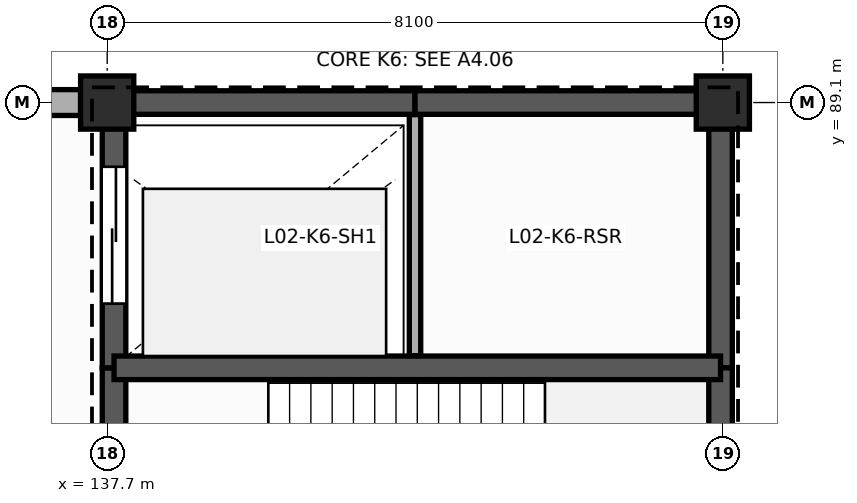
"""IFC4 building model, lengths in metres.
Left out: names, types, materials, properties, quantities, classifications, styles, units other than length and angle.
Written with IfcOpenShell. Run it as: python <this file> out.ifc"""

import sys

from ifc_helpers import new_model, si_unit, direction, frame, frame_2d, origin, origin_2d, place, context, subcontext, project, spatial, rectangle, extrude, element, fill, save


model = new_model("IFC4")
c1 = context("Model", 3, precision=1e-05, world=origin(), true_north=direction((0.0, 1.0)))
c2 = subcontext(c1, "Body", "Model", "MODEL_VIEW")
j1 = project(units=[si_unit("LENGTHUNIT", "METRE"), si_unit("PLANEANGLEUNIT", "RADIAN")], contexts=[c1])
p1 = place(None, origin())
s1 = spatial("IfcSite", under=j1, at=p1, CompositionType="ELEMENT")
p2 = place(p1, origin())
s2 = spatial("IfcBuilding", under=s1, at=p2, CompositionType="ELEMENT")
p3 = place(p2, frame((0.0, 0.0, 10.2)))
s3 = spatial("IfcBuildingStorey", under=s2, at=p3, CompositionType="ELEMENT", Elevation=10.2)
for number, where, z_axis, x_axis in (
    (1, (137.7, 89.1, 0.0), (0.0, 0.0, 1.0), (1.0, 0.0, 0.0)),
    (2, (145.8, 89.1, 0.0), (0.0, 0.0, 1.0), (1.0, 0.0, 0.0)),
):
    element("IfcColumn", number, at=place(p3, frame(where, z_axis=z_axis, x_axis=x_axis)), inside=s3, PredefinedType="COLUMN", context=c2, shape_type="SweptSolid", body=[
        extrude(rectangle(XDim=0.7, YDim=0.7, at=origin_2d()), origin(), (0.0, 0.0, 1.0), 4.8),
    ])
p4 = place(p3, frame((137.35, 89.1, 0.0), z_axis=(0.0, 0.0, 1.0), x_axis=(-1.0, 0.0, 0.0)))
e3 = element("IfcWall", 3, at=p4, inside=s3, PredefinedType="SOLIDWALL", context=c2, shape_type="SweptSolid", body=[
    extrude(rectangle(XDim=7.4, YDim=0.34, at=frame_2d((3.7, 0.0))), origin(), (0.0, 0.0, 1.0), 4.127),
])
p5 = place(p3, frame((137.79, 81.25, 0.0), z_axis=(0.0, 0.0, 1.0), x_axis=(0.0, 1.0, 0.0)))
e4 = element("IfcWall", 4, at=p5, inside=s3, PredefinedType="SHEAR", context=c2, shape_type="SweptSolid", body=[
    extrude(rectangle(XDim=4.36, YDim=0.31, at=frame_2d((2.18, 0.0))), origin(), (0.0, 0.0, 1.0), 4.8),
])
p6 = place(p5, frame((1.35, 0.0, 0.0)))
e5 = element("IfcOpeningElement", 5, at=p6, cuts=e4, PredefinedType="OPENING", context=c2, shape_type="SweptSolid", body=[
    extrude(rectangle(XDim=1.2, YDim=2.25, at=frame_2d((0.6, 1.125))), frame((0.0, 0.165, 0.0), z_axis=(0.0, -1.0, 0.0), x_axis=(1.0, 0.0, 0.0)), (0.0, 0.0, 1.0), 0.33),
])
p7 = place(p3, frame((137.79, 85.61, 0.0), z_axis=(0.0, 0.0, 1.0), x_axis=(0.0, 1.0, 0.0)))
e6 = element("IfcWall", 6, at=p7, inside=s3, PredefinedType="SHEAR", context=c2, shape_type="SweptSolid", body=[
    extrude(rectangle(XDim=3.49, YDim=0.31, at=frame_2d((1.745, 0.0))), origin(), (0.0, 0.0, 1.0), 4.8),
])
p8 = place(p7, frame((0.845, 0.0, 0.0)))
e7 = element("IfcOpeningElement", 7, at=p8, cuts=e6, PredefinedType="OPENING", context=c2, shape_type="SweptSolid", body=[
    extrude(rectangle(XDim=1.8, YDim=2.4, at=frame_2d((0.9, 1.2))), frame((0.0, 0.165, 0.0), z_axis=(0.0, -1.0, 0.0), x_axis=(1.0, 0.0, 0.0)), (0.0, 0.0, 1.0), 0.33),
])
p9 = place(p3, frame((137.79, 89.1, 0.0), z_axis=(0.0, 0.0, 1.0), x_axis=(1.0, 0.0, 0.0)))
e8 = element("IfcWall", 8, at=p9, inside=s3, PredefinedType="SHEAR", context=c2, shape_type="SweptSolid", body=[
    extrude(rectangle(XDim=3.96, YDim=0.31, at=frame_2d((1.98, 0.0))), origin(), (0.0, 0.0, 1.0), 4.8),
])
p10 = place(p3, frame((141.75, 89.1, 0.0), z_axis=(0.0, 0.0, 1.0), x_axis=(1.0, 0.0, 0.0)))
e9 = element("IfcWall", 9, at=p10, inside=s3, PredefinedType="SHEAR", context=c2, shape_type="SweptSolid", body=[
    extrude(rectangle(XDim=4.02, YDim=0.31, at=frame_2d((2.01, 0.0))), origin(), (0.0, 0.0, 1.0), 4.8),
])
p11 = place(p3, frame((145.77, 89.1, 0.0), z_axis=(0.0, 0.0, 1.0), x_axis=(0.0, -1.0, 0.0)))
e10 = element("IfcWall", 10, at=p11, inside=s3, PredefinedType="SHEAR", context=c2, shape_type="SweptSolid", body=[
    extrude(rectangle(XDim=3.49, YDim=0.31, at=frame_2d((1.745, 0.0))), origin(), (0.0, 0.0, 1.0), 4.8),
])
p12 = place(p3, frame((145.77, 85.61, 0.0), z_axis=(0.0, 0.0, 1.0), x_axis=(0.0, -1.0, 0.0)))
e11 = element("IfcWall", 11, at=p12, inside=s3, PredefinedType="SHEAR", context=c2, shape_type="SweptSolid", body=[
    extrude(rectangle(XDim=4.36, YDim=0.31, at=frame_2d((2.18, 0.0))), origin(), (0.0, 0.0, 1.0), 4.8),
])
p13 = place(p3, frame((137.79, 85.61, 0.0), z_axis=(0.0, 0.0, 1.0), x_axis=(1.0, 0.0, 0.0)))
e12 = element("IfcWall", 12, at=p13, inside=s3, PredefinedType="SHEAR", context=c2, shape_type="SweptSolid", body=[
    extrude(rectangle(XDim=7.98, YDim=0.31, at=frame_2d((3.99, 0.0))), origin(), (0.0, 0.0, 1.0), 4.8),
])
p14 = place(p3, frame((141.75, 85.77, 0.0), z_axis=(0.0, 0.0, 1.0), x_axis=(0.0, 1.0, 0.0)))
e13 = element("IfcWall", 13, at=p14, inside=s3, PredefinedType="PLUMBINGWALL", context=c2, shape_type="SweptSolid", body=[
    extrude(rectangle(XDim=3.17, YDim=0.15, at=frame_2d((1.585, 0.0))), origin(), (0.0, 0.0, 1.0), 4.45),
])
p15 = place(p8, origin())
e14 = element("IfcDoor", 14, at=p15, inside=s3, OperationType="SLIDING_TO_LEFT", PredefinedType="DOOR", context=c2, shape_type="SweptSolid", body=[
    extrude(rectangle(XDim=1.8, YDim=2.4, at=frame_2d((0.9, 1.2))), frame((0.0, 0.025, 0.0), z_axis=(0.0, -1.0, 0.0), x_axis=(1.0, 0.0, 0.0)), (0.0, 0.0, 1.0), 0.05),
])
fill(e7, e14)
save(model, sys.argv[1])
